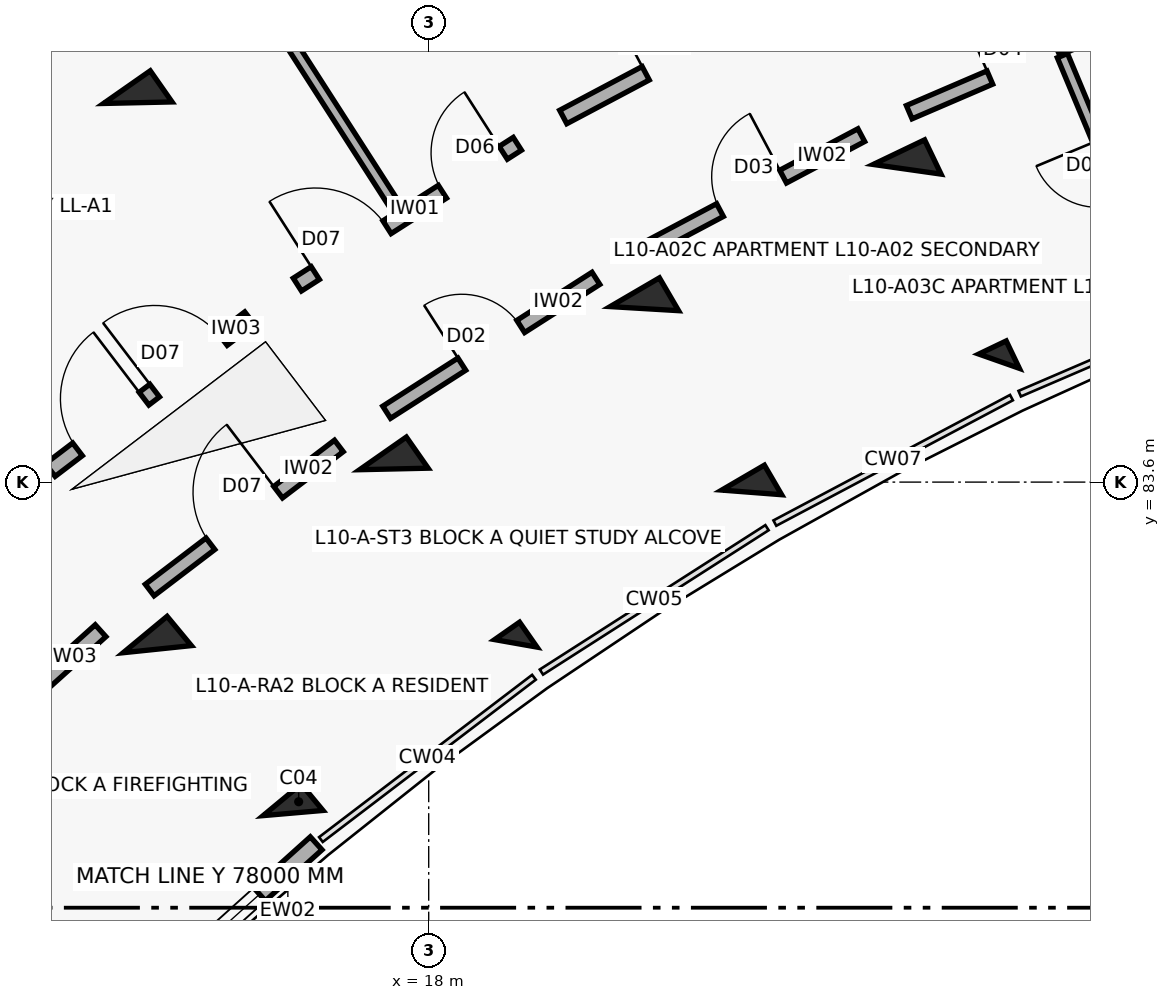
"""IFC4 building model, lengths in metres.
Left out: names, types, materials, properties, quantities, classifications, styles, units other than length and angle.
Written with IfcOpenShell. Run it as: python <this file> out.ifc"""

import sys

from ifc_helpers import new_model, si_unit, direction, frame, frame_2d, origin, origin_2d, place, context, subcontext, project, spatial, rectangle, extrude, element, fill, save


model = new_model("IFC4")
c1 = context("Model", 3, precision=1e-05, world=origin(), true_north=direction((0.0, 1.0)))
c2 = subcontext(c1, "Body", "Model", "MODEL_VIEW")
j1 = project(units=[si_unit("LENGTHUNIT", "METRE"), si_unit("PLANEANGLEUNIT", "RADIAN")], contexts=[c1])
p1 = place(None, origin())
s1 = spatial("IfcSite", under=j1, at=p1, CompositionType="ELEMENT")
p2 = place(p1, origin())
s2 = spatial("IfcBuilding", under=s1, at=p2, CompositionType="ELEMENT")
p3 = place(p2, frame((0.0, 0.0, 32.9)))
s3 = spatial("IfcBuildingStorey", under=s2, at=p3, CompositionType="ELEMENT", Elevation=32.9)
p4 = place(p3, frame((16.215, 79.245, 0.0), z_axis=(0.0, 0.0, 1.0), x_axis=(-0.637961754089, 0.770068049148, 0.0)))
e1 = element("IfcColumn", 1, at=p4, inside=s3, PredefinedType="COLUMN", context=c2, shape_type="SweptSolid", body=[
    extrude(rectangle(XDim=0.45, YDim=0.65, at=origin_2d()), origin(), (0.0, 0.0, 1.0), 3.1),
])
p5 = place(p3, frame((14.429, 81.402, 0.0), z_axis=(0.0, 0.0, 1.0), x_axis=(-0.637961754089, 0.770068049148, 0.0)))
e2 = element("IfcColumn", 2, at=p5, inside=s3, PredefinedType="COLUMN", context=c2, shape_type="SweptSolid", body=[
    extrude(rectangle(XDim=0.5, YDim=0.75, at=origin_2d()), origin(), (0.0, 0.0, 1.0), 3.1),
])
p6 = place(p3, frame((19.146, 81.478, 0.0), z_axis=(0.0, 0.0, 1.0), x_axis=(-0.573004420611, 0.819552276527, 0.0)))
e3 = element("IfcColumn", 3, at=p6, inside=s3, PredefinedType="COLUMN", context=c2, shape_type="SweptSolid", body=[
    extrude(rectangle(XDim=0.4, YDim=0.4, at=origin_2d()), origin(), (0.0, 0.0, 1.0), 3.1),
])
for number, where, z_axis, x_axis in (
    (4, (17.542, 83.773, 0.0), (0.0, 0.0, 1.0), (-0.573, 0.82, 0.0)),
    (5, (14.172, 88.592, 0.0), (0.0, 0.0, 1.0), (-0.573, 0.82, 0.0)),
):
    element("IfcColumn", number, at=place(p3, frame(where, z_axis=z_axis, x_axis=x_axis)), inside=s3, PredefinedType="COLUMN", context=c2, shape_type="SweptSolid", body=[
        extrude(rectangle(XDim=0.5, YDim=0.75, at=origin_2d()), origin(), (0.0, 0.0, 1.0), 3.1),
    ])
p7 = place(p3, frame((22.249, 83.464, 0.0), z_axis=(0.0, 0.0, 1.0), x_axis=(-0.504226211181, 0.863571611366, 0.0)))
e6 = element("IfcColumn", 6, at=p7, inside=s3, PredefinedType="COLUMN", context=c2, shape_type="SweptSolid", body=[
    extrude(rectangle(XDim=0.45, YDim=0.65, at=origin_2d()), origin(), (0.0, 0.0, 1.0), 3.1),
])
p8 = place(p3, frame((20.837, 85.882, 0.0), z_axis=(0.0, 0.0, 1.0), x_axis=(-0.504226211181, 0.863571611366, 0.0)))
e7 = element("IfcColumn", 7, at=p8, inside=s3, PredefinedType="COLUMN", context=c2, shape_type="SweptSolid", body=[
    extrude(rectangle(XDim=0.5, YDim=0.75, at=origin_2d()), origin(), (0.0, 0.0, 1.0), 3.1),
])
p9 = place(p3, frame((25.504, 85.191, 0.0), z_axis=(0.0, 0.0, 1.0), x_axis=(-0.432085748802, 0.901832526405, 0.0)))
e8 = element("IfcColumn", 8, at=p9, inside=s3, PredefinedType="COLUMN", context=c2, shape_type="SweptSolid", body=[
    extrude(rectangle(XDim=0.4, YDim=0.4, at=origin_2d()), origin(), (0.0, 0.0, 1.0), 3.1),
])
p10 = place(p3, frame((24.294, 87.716, 0.0), z_axis=(0.0, 0.0, 1.0), x_axis=(-0.432085748802, 0.901832526405, 0.0)))
e9 = element("IfcColumn", 9, at=p10, inside=s3, PredefinedType="COLUMN", context=c2, shape_type="SweptSolid", body=[
    extrude(rectangle(XDim=0.5, YDim=0.75, at=origin_2d()), origin(), (0.0, 0.0, 1.0), 3.1),
])
p11 = place(p3, frame((13.84, 76.437, 0.0), z_axis=(0.0, 0.0, 1.0), x_axis=(0.743385092197, 0.668863666751, 0.0)))
e10 = element("IfcWall", 10, at=p11, inside=s3, PredefinedType="SOLIDWALL", context=c2, shape_type="SweptSolid", body=[
    extrude(rectangle(XDim=3.604, YDim=0.23, at=frame_2d((1.802, 0.0))), origin(), (0.0, 0.0, 1.0), 2.25),
])
p12 = place(p11, frame((1.002, 0.0, 0.32)))
e11 = element("IfcOpeningElement", 11, at=p12, cuts=e10, PredefinedType="OPENING", context=c2, shape_type="SweptSolid", body=[
    extrude(rectangle(XDim=1.6, YDim=1.5, at=frame_2d((0.8, 0.75))), frame((0.0, 0.125, 0.0), z_axis=(0.0, -1.0, 0.0), x_axis=(1.0, 0.0, 0.0)), (0.0, 0.0, 1.0), 0.25),
])
p13 = place(p3, frame((11.357, 79.552, 0.0), z_axis=(0.0, 0.0, 1.0), x_axis=(0.743387266925, 0.668861249718, 0.0)))
e12 = element("IfcWall", 12, at=p13, inside=s3, PredefinedType="SOLIDWALL", context=c2, shape_type="SweptSolid", body=[
    extrude(rectangle(XDim=3.128, YDim=0.21, at=frame_2d((1.564, 0.0))), origin(), (0.0, 0.0, 1.0), 2.08),
])
p14 = place(p13, frame((1.014, 0.0, 0.0)))
e13 = element("IfcOpeningElement", 13, at=p14, cuts=e12, PredefinedType="OPENING", context=c2, shape_type="SweptSolid", body=[
    extrude(rectangle(XDim=1.1, YDim=2.15, at=frame_2d((0.55, 1.075))), frame((0.0, 0.115, 0.0), z_axis=(0.0, -1.0, 0.0), x_axis=(1.0, 0.0, 0.0)), (0.0, 0.0, 1.0), 0.23),
])
p15 = place(p3, frame((13.021, 83.759, 0.0), z_axis=(0.0, 0.0, 1.0), x_axis=(0.795498026433, 0.605956178235, 0.0)))
e14 = element("IfcWall", 14, at=p15, inside=s3, PredefinedType="SOLIDWALL", context=c2, shape_type="SweptSolid", body=[
    extrude(rectangle(XDim=3.296, YDim=0.21, at=frame_2d((1.648, 0.0))), origin(), (0.0, 0.0, 1.0), 2.08),
])
p16 = place(p15, frame((0.45, 0.0, 0.0)))
e15 = element("IfcOpeningElement", 15, at=p16, cuts=e14, PredefinedType="OPENING", context=c2, shape_type="SweptSolid", body=[
    extrude(rectangle(XDim=1.1, YDim=2.15, at=frame_2d((0.55, 1.075))), frame((0.0, 0.115, 0.0), z_axis=(0.0, -1.0, 0.0), x_axis=(1.0, 0.0, 0.0)), (0.0, 0.0, 1.0), 0.23),
])
p17 = place(p15, frame((1.726, 0.0, 0.0)))
e16 = element("IfcOpeningElement", 16, at=p17, cuts=e14, PredefinedType="OPENING", context=c2, shape_type="SweptSolid", body=[
    extrude(rectangle(XDim=1.12, YDim=2.15, at=frame_2d((0.56, 1.075))), frame((0.0, 0.115, 0.0), z_axis=(0.0, -1.0, 0.0), x_axis=(1.0, 0.0, 0.0)), (0.0, 0.0, 1.0), 0.23),
])
p18 = place(p3, frame((14.329, 82.18, 0.0), z_axis=(0.0, 0.0, 1.0), x_axis=(0.795501577908, 0.605951515838, 0.0)))
e17 = element("IfcWall", 17, at=p18, inside=s3, PredefinedType="SOLIDWALL", context=c2, shape_type="SweptSolid", body=[
    extrude(rectangle(XDim=3.129, YDim=0.19, at=frame_2d((1.564, 0.0))), origin(), (0.0, 0.0, 1.0), 2.08),
])
p19 = place(p18, frame((1.004, 0.0, 0.0)))
e18 = element("IfcOpeningElement", 18, at=p19, cuts=e17, PredefinedType="OPENING", context=c2, shape_type="SweptSolid", body=[
    extrude(rectangle(XDim=1.12, YDim=2.15, at=frame_2d((0.56, 1.075))), frame((0.0, 0.105, 0.0), z_axis=(0.0, -1.0, 0.0), x_axis=(1.0, 0.0, 0.0)), (0.0, 0.0, 1.0), 0.21),
])
p20 = place(p3, frame((16.272, 86.199, 0.0), z_axis=(0.0, 0.0, 1.0), x_axis=(0.842257205985, 0.539075874963, 0.0)))
e19 = element("IfcWall", 19, at=p20, inside=s3, PredefinedType="SOLIDWALL", context=c2, shape_type="SweptSolid", body=[
    extrude(rectangle(XDim=3.436, YDim=0.2, at=frame_2d((1.718, 0.0))), origin(), (0.0, 0.0, 1.0), 2.08),
])
p21 = place(p20, frame((0.28, 0.0, 0.0)))
e20 = element("IfcOpeningElement", 20, at=p21, cuts=e19, PredefinedType="OPENING", context=c2, shape_type="SweptSolid", body=[
    extrude(rectangle(XDim=1.12, YDim=2.15, at=frame_2d((0.56, 1.075))), frame((0.0, 0.11, 0.0), z_axis=(0.0, -1.0, 0.0), x_axis=(1.0, 0.0, 0.0)), (0.0, 0.0, 1.0), 0.22),
])
p22 = place(p20, frame((2.266, 0.0, 0.0)))
e21 = element("IfcOpeningElement", 21, at=p22, cuts=e19, PredefinedType="OPENING", context=c2, shape_type="SweptSolid", body=[
    extrude(rectangle(XDim=0.95, YDim=2.1, at=frame_2d((0.475, 1.05))), frame((0.0, 0.11, 0.0), z_axis=(0.0, -1.0, 0.0), x_axis=(1.0, 0.0, 0.0)), (0.0, 0.0, 1.0), 0.22),
])
p23 = place(p3, frame((17.447, 84.519, 0.0), z_axis=(0.0, 0.0, 1.0), x_axis=(0.842225276846, 0.539125758095, 0.0)))
e22 = element("IfcWall", 22, at=p23, inside=s3, PredefinedType="SOLIDWALL", context=c2, shape_type="SweptSolid", body=[
    extrude(rectangle(XDim=3.269, YDim=0.19, at=frame_2d((1.634, 0.0))), origin(), (0.0, 0.0, 1.0), 2.08),
])
p24 = place(p23, frame((1.174, 0.0, 0.0)))
e23 = element("IfcOpeningElement", 23, at=p24, cuts=e22, PredefinedType="OPENING", context=c2, shape_type="SweptSolid", body=[
    extrude(rectangle(XDim=0.92, YDim=2.1, at=frame_2d((0.46, 1.05))), frame((0.0, 0.105, 0.0), z_axis=(0.0, -1.0, 0.0), x_axis=(1.0, 0.0, 0.0)), (0.0, 0.0, 1.0), 0.21),
])
p25 = place(p3, frame((17.524, 87.288, 0.0), z_axis=(0.0, 0.0, 1.0), x_axis=(-0.540338452216, 0.841447774408, 0.0)))
e24 = element("IfcWall", 24, at=p25, inside=s3, PredefinedType="PARTITIONING", context=c2, shape_type="SweptSolid", body=[
    extrude(rectangle(XDim=7.95, YDim=0.14, at=frame_2d((3.975, 0.0))), origin(), (0.0, 0.0, 1.0), 2.08),
])
p26 = place(p25, frame((6.05, 0.0, 0.0)))
e25 = element("IfcOpeningElement", 25, at=p26, cuts=e24, PredefinedType="OPENING", context=c2, shape_type="SweptSolid", body=[
    extrude(rectangle(XDim=0.92, YDim=2.1, at=frame_2d((0.46, 1.05))), frame((0.0, 0.08, 0.0), z_axis=(0.0, -1.0, 0.0), x_axis=(1.0, 0.0, 0.0)), (0.0, 0.0, 1.0), 0.16),
])
p27 = place(p3, frame((19.77, 88.404, 0.0), z_axis=(0.0, 0.0, 1.0), x_axis=(0.883410853063, 0.468599258099, 0.0)))
e26 = element("IfcWall", 26, at=p27, inside=s3, PredefinedType="SOLIDWALL", context=c2, shape_type="SweptSolid", body=[
    extrude(rectangle(XDim=3.436, YDim=0.2, at=frame_2d((1.718, 0.0))), origin(), (0.0, 0.0, 1.0), 2.08),
])
p28 = place(p27, frame((1.228, 0.0, 0.0)))
e27 = element("IfcOpeningElement", 27, at=p28, cuts=e26, PredefinedType="OPENING", context=c2, shape_type="SweptSolid", body=[
    extrude(rectangle(XDim=0.98, YDim=2.15, at=frame_2d((0.49, 1.075))), frame((0.0, 0.11, 0.0), z_axis=(0.0, -1.0, 0.0), x_axis=(1.0, 0.0, 0.0)), (0.0, 0.0, 1.0), 0.22),
])
p29 = place(p3, frame((20.804, 86.634, 0.0), z_axis=(0.0, 0.0, 1.0), x_axis=(0.883444301944, 0.468536194293, 0.0)))
e28 = element("IfcWall", 28, at=p29, inside=s3, PredefinedType="SOLIDWALL", context=c2, shape_type="SweptSolid", body=[
    extrude(rectangle(XDim=3.269, YDim=0.19, at=frame_2d((1.634, 0.0))), origin(), (0.0, 0.0, 1.0), 2.08),
])
p30 = place(p29, frame((1.164, 0.0, 0.0)))
e29 = element("IfcOpeningElement", 29, at=p30, cuts=e28, PredefinedType="OPENING", context=c2, shape_type="SweptSolid", body=[
    extrude(rectangle(XDim=0.94, YDim=2.1, at=frame_2d((0.47, 1.05))), frame((0.0, 0.105, 0.0), z_axis=(0.0, -1.0, 0.0), x_axis=(1.0, 0.0, 0.0)), (0.0, 0.0, 1.0), 0.21),
])
p31 = place(p3, frame((24.322, 88.467, 0.0), z_axis=(0.0, 0.0, 1.0), x_axis=(0.918723391052, 0.394901672235, 0.0)))
e30 = element("IfcWall", 30, at=p31, inside=s3, PredefinedType="SOLIDWALL", context=c2, shape_type="SweptSolid", body=[
    extrude(rectangle(XDim=3.269, YDim=0.19, at=frame_2d((1.634, 0.0))), origin(), (0.0, 0.0, 1.0), 2.08),
])
p32 = place(p31, frame((1.154, 0.0, 0.0)))
e31 = element("IfcOpeningElement", 31, at=p32, cuts=e30, PredefinedType="OPENING", context=c2, shape_type="SweptSolid", body=[
    extrude(rectangle(XDim=0.96, YDim=2.1, at=frame_2d((0.48, 1.05))), frame((0.0, 0.105, 0.0), z_axis=(0.0, -1.0, 0.0), x_axis=(1.0, 0.0, 0.0)), (0.0, 0.0, 1.0), 0.21),
])
p33 = place(p3, frame((27.609, 86.166, 0.0), z_axis=(0.0, 0.0, 1.0), x_axis=(-0.385151143297, 0.922853507777, 0.0)))
e32 = element("IfcWall", 32, at=p33, inside=s3, PredefinedType="PARTITIONING", context=c2, shape_type="SweptSolid", body=[
    extrude(rectangle(XDim=3.3, YDim=0.145, at=frame_2d((1.65, 0.0))), origin(), (0.0, 0.0, 1.0), 2.08),
])
p34 = place(p33, frame((1.21, 0.0, 0.0)))
e33 = element("IfcOpeningElement", 33, at=p34, cuts=e32, PredefinedType="OPENING", context=c2, shape_type="SweptSolid", body=[
    extrude(rectangle(XDim=0.88, YDim=2.1, at=frame_2d((0.44, 1.05))), frame((0.0, 0.083, 0.0), z_axis=(0.0, -1.0, 0.0), x_axis=(1.0, 0.0, 0.0)), (0.0, 0.0, 1.0), 0.165),
])
p35 = place(p12, origin())
e34 = element("IfcWindow", 34, at=p35, inside=s3, PartitioningType="DOUBLE_PANEL_VERTICAL", PredefinedType="WINDOW", context=c2, shape_type="SweptSolid", body=[
    extrude(rectangle(XDim=1.6, YDim=1.5, at=frame_2d((0.8, 0.75))), frame((0.0, 0.03, 0.0), z_axis=(0.0, -1.0, 0.0), x_axis=(1.0, 0.0, 0.0)), (0.0, 0.0, 1.0), 0.06),
])
fill(e11, e34)
p36 = place(p16, origin())
e35 = element("IfcDoor", 35, at=p36, inside=s3, OperationType="SINGLE_SWING_RIGHT", PredefinedType="DOOR", context=c2, shape_type="SweptSolid", body=[
    extrude(rectangle(XDim=1.1, YDim=2.15, at=frame_2d((0.55, 1.075))), frame((0.0, 0.025, 0.0), z_axis=(0.0, -1.0, 0.0), x_axis=(1.0, 0.0, 0.0)), (0.0, 0.0, 1.0), 0.05),
])
fill(e15, e35)
p37 = place(p17, origin())
e36 = element("IfcDoor", 36, at=p37, inside=s3, OperationType="SINGLE_SWING_LEFT", PredefinedType="DOOR", context=c2, shape_type="SweptSolid", body=[
    extrude(rectangle(XDim=1.12, YDim=2.15, at=frame_2d((0.56, 1.075))), frame((0.0, 0.025, 0.0), z_axis=(0.0, -1.0, 0.0), x_axis=(1.0, 0.0, 0.0)), (0.0, 0.0, 1.0), 0.05),
])
fill(e16, e36)
p38 = place(p19, origin())
e37 = element("IfcDoor", 37, at=p38, inside=s3, OperationType="SINGLE_SWING_RIGHT", PredefinedType="DOOR", context=c2, shape_type="SweptSolid", body=[
    extrude(rectangle(XDim=1.12, YDim=2.15, at=frame_2d((0.56, 1.075))), frame((0.0, 0.025, 0.0), z_axis=(0.0, -1.0, 0.0), x_axis=(1.0, 0.0, 0.0)), (0.0, 0.0, 1.0), 0.05),
])
fill(e18, e37)
p39 = place(p21, origin())
e38 = element("IfcDoor", 38, at=p39, inside=s3, OperationType="SINGLE_SWING_LEFT", PredefinedType="DOOR", context=c2, shape_type="SweptSolid", body=[
    extrude(rectangle(XDim=1.12, YDim=2.15, at=frame_2d((0.56, 1.075))), frame((0.0, 0.025, 0.0), z_axis=(0.0, -1.0, 0.0), x_axis=(1.0, 0.0, 0.0)), (0.0, 0.0, 1.0), 0.05),
])
fill(e20, e38)
p40 = place(p22, origin())
e39 = element("IfcDoor", 39, at=p40, inside=s3, OperationType="SINGLE_SWING_RIGHT", PredefinedType="DOOR", context=c2, shape_type="SweptSolid", body=[
    extrude(rectangle(XDim=0.95, YDim=2.1, at=frame_2d((0.475, 1.05))), frame((0.0, 0.025, 0.0), z_axis=(0.0, -1.0, 0.0), x_axis=(1.0, 0.0, 0.0)), (0.0, 0.0, 1.0), 0.05),
])
fill(e21, e39)
p41 = place(p24, origin())
e40 = element("IfcDoor", 40, at=p41, inside=s3, OperationType="SINGLE_SWING_LEFT", PredefinedType="DOOR", context=c2, shape_type="SweptSolid", body=[
    extrude(rectangle(XDim=0.92, YDim=2.1, at=frame_2d((0.46, 1.05))), frame((0.0, 0.025, 0.0), z_axis=(0.0, -1.0, 0.0), x_axis=(1.0, 0.0, 0.0)), (0.0, 0.0, 1.0), 0.05),
])
fill(e23, e40)
p42 = place(p28, origin())
e41 = element("IfcDoor", 41, at=p42, inside=s3, OperationType="SINGLE_SWING_LEFT", PredefinedType="DOOR", context=c2, shape_type="SweptSolid", body=[
    extrude(rectangle(XDim=0.98, YDim=2.15, at=frame_2d((0.49, 1.075))), frame((0.0, 0.025, 0.0), z_axis=(0.0, -1.0, 0.0), x_axis=(1.0, 0.0, 0.0)), (0.0, 0.0, 1.0), 0.05),
])
fill(e27, e41)
p43 = place(p30, origin())
e42 = element("IfcDoor", 42, at=p43, inside=s3, OperationType="SINGLE_SWING_RIGHT", PredefinedType="DOOR", context=c2, shape_type="SweptSolid", body=[
    extrude(rectangle(XDim=0.94, YDim=2.1, at=frame_2d((0.47, 1.05))), frame((0.0, 0.025, 0.0), z_axis=(0.0, -1.0, 0.0), x_axis=(1.0, 0.0, 0.0)), (0.0, 0.0, 1.0), 0.05),
])
fill(e29, e42)
p44 = place(p32, origin())
e43 = element("IfcDoor", 43, at=p44, inside=s3, OperationType="SINGLE_SWING_LEFT", PredefinedType="DOOR", context=c2, shape_type="SweptSolid", body=[
    extrude(rectangle(XDim=0.96, YDim=2.1, at=frame_2d((0.48, 1.05))), frame((0.0, 0.025, 0.0), z_axis=(0.0, -1.0, 0.0), x_axis=(1.0, 0.0, 0.0)), (0.0, 0.0, 1.0), 0.05),
])
fill(e31, e43)
save(model, sys.argv[1])
